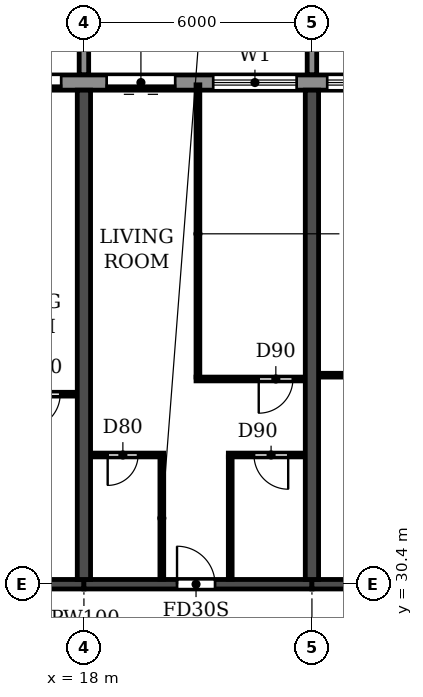
"""IFC4 building model, lengths in metres.
Left out: names, types, materials, properties, quantities, classifications, styles, units other than length and angle.
Written with IfcOpenShell. Run it as: python <this file> out.ifc"""

import sys

from ifc_helpers import new_model, si_unit, direction, frame, frame_2d, origin, place, context, subcontext, project, spatial, polyline, rectangle, outline, extrude, source, transform, mapped, element, fill, save


model = new_model("IFC4")
c1 = context("Model", 3, precision=1e-05, world=origin(), true_north=direction((0.0, 1.0)))
c2 = subcontext(c1, "Body", "Model", "MODEL_VIEW")
j1 = project(units=[si_unit("LENGTHUNIT", "METRE"), si_unit("PLANEANGLEUNIT", "RADIAN")], contexts=[c1])
p1 = place(None, origin())
s1 = spatial("IfcSite", under=j1, at=p1, CompositionType="ELEMENT")
p2 = place(p1, origin())
s2 = spatial("IfcBuilding", under=s1, at=p2, CompositionType="ELEMENT")
p3 = place(p2, frame((0.0, 0.0, 76.2)))
s3 = spatial("IfcBuildingStorey", under=s2, at=p3, CompositionType="ELEMENT", Elevation=76.2)
for number, where, z_axis, x_axis in (
    (1, (18.0, 30.525, 0.0), (0.0, 0.0, 1.0), (0.0, 1.0, 0.0)),
    (2, (24.0, 30.525, 0.0), (0.0, 0.0, 1.0), (0.0, 1.0, 0.0)),
):
    element("IfcWall", number, at=place(p3, frame(where, z_axis=z_axis, x_axis=x_axis)), inside=s3, PredefinedType="SHEAR", context=c2, shape_type="SweptSolid", body=[
        extrude(rectangle(XDim=12.875, YDim=0.35, at=frame_2d((6.438, 0.0))), origin(), (0.0, 0.0, 1.0), 3.06),
    ])
p4 = place(p3, frame((12.0, 30.4, 0.0), z_axis=(0.0, 0.0, 1.0), x_axis=(1.0, 0.0, 0.0)))
e3 = element("IfcWall", 3, at=p4, inside=s3, PredefinedType="SHEAR", context=c2, shape_type="SweptSolid", body=[
    extrude(rectangle(XDim=6.0, YDim=0.25, at=frame_2d((3.0, 0.0))), origin(), (0.0, 0.0, 1.0), 2.46),
])
p5 = place(p4, frame((2.45, 0.0, 0.0)))
e4 = element("IfcOpeningElement", 4, at=p5, cuts=e3, PredefinedType="OPENING", context=c2, shape_type="SweptSolid", body=[
    extrude(rectangle(XDim=1.0, YDim=2.1, at=frame_2d((0.5, 1.05))), frame((0.0, 0.135, 0.0), z_axis=(0.0, -1.0, 0.0), x_axis=(1.0, 0.0, 0.0)), (0.0, 0.0, 1.0), 0.27),
])
p6 = place(p3, frame((18.0, 30.4, 0.0), z_axis=(0.0, 0.0, 1.0), x_axis=(1.0, 0.0, 0.0)))
e5 = element("IfcWall", 5, at=p6, inside=s3, PredefinedType="SHEAR", context=c2, shape_type="SweptSolid", body=[
    extrude(rectangle(XDim=6.0, YDim=0.25, at=frame_2d((3.0, 0.0))), origin(), (0.0, 0.0, 1.0), 2.46),
])
p7 = place(p6, frame((2.45, 0.0, 0.0)))
e6 = element("IfcOpeningElement", 6, at=p7, cuts=e5, PredefinedType="OPENING", context=c2, shape_type="SweptSolid", body=[
    extrude(rectangle(XDim=1.0, YDim=2.1, at=frame_2d((0.5, 1.05))), frame((0.0, 0.135, 0.0), z_axis=(0.0, -1.0, 0.0), x_axis=(1.0, 0.0, 0.0)), (0.0, 0.0, 1.0), 0.27),
])
p8 = place(p3, frame((24.0, 30.4, 0.0), z_axis=(0.0, 0.0, 1.0), x_axis=(1.0, 0.0, 0.0)))
e7 = element("IfcWall", 7, at=p8, inside=s3, PredefinedType="SHEAR", context=c2, shape_type="SweptSolid", body=[
    extrude(rectangle(XDim=6.0, YDim=0.25, at=frame_2d((3.0, 0.0))), origin(), (0.0, 0.0, 1.0), 2.46),
])
p9 = place(p8, frame((2.55, 0.0, 0.0)))
e8 = element("IfcOpeningElement", 8, at=p9, cuts=e7, PredefinedType="OPENING", context=c2, shape_type="SweptSolid", body=[
    extrude(rectangle(XDim=1.0, YDim=2.1, at=frame_2d((0.5, 1.05))), frame((0.0, 0.135, 0.0), z_axis=(0.0, -1.0, 0.0), x_axis=(1.0, 0.0, 0.0)), (0.0, 0.0, 1.0), 0.27),
])
p10 = place(p3, frame((91.317, 43.6, 0.0), z_axis=(0.0, 0.0, 1.0), x_axis=(-1.0, 0.0, 0.0)))
e9 = element("IfcWall", 9, at=p10, inside=s3, PredefinedType="STANDARD", context=c2, shape_type="SweptSolid", body=[
    extrude(rectangle(XDim=80.634, YDim=0.4, at=frame_2d((40.317, 0.0))), origin(), (0.0, 0.0, 1.0), 3.06),
])
p11 = place(p10, frame((76.717, 0.0, 0.9)))
e10 = element("IfcOpeningElement", 10, at=p11, cuts=e9, PredefinedType="OPENING", context=c2, shape_type="SweptSolid", body=[
    extrude(rectangle(XDim=2.2, YDim=1.5, at=frame_2d((1.1, 0.75))), frame((0.0, 0.21, 0.0), z_axis=(0.0, -1.0, 0.0), x_axis=(1.0, 0.0, 0.0)), (0.0, 0.0, 1.0), 0.42),
])
p12 = place(p10, frame((73.917, 0.0, 0.0)))
e11 = element("IfcOpeningElement", 11, at=p12, cuts=e9, PredefinedType="OPENING", context=c2, shape_type="SweptSolid", body=[
    extrude(rectangle(XDim=1.8, YDim=2.4, at=frame_2d((0.9, 1.2))), frame((0.0, 0.21, 0.0), z_axis=(0.0, -1.0, 0.0), x_axis=(1.0, 0.0, 0.0)), (0.0, 0.0, 1.0), 0.42),
])
p13 = place(p10, frame((70.917, 0.0, 0.0)))
e12 = element("IfcOpeningElement", 12, at=p13, cuts=e9, PredefinedType="OPENING", context=c2, shape_type="SweptSolid", body=[
    extrude(rectangle(XDim=1.8, YDim=2.4, at=frame_2d((0.9, 1.2))), frame((0.0, 0.21, 0.0), z_axis=(0.0, -1.0, 0.0), x_axis=(1.0, 0.0, 0.0)), (0.0, 0.0, 1.0), 0.42),
])
p14 = place(p10, frame((67.717, 0.0, 0.9)))
e13 = element("IfcOpeningElement", 13, at=p14, cuts=e9, PredefinedType="OPENING", context=c2, shape_type="SweptSolid", body=[
    extrude(rectangle(XDim=2.2, YDim=1.5, at=frame_2d((1.1, 0.75))), frame((0.0, 0.21, 0.0), z_axis=(0.0, -1.0, 0.0), x_axis=(1.0, 0.0, 0.0)), (0.0, 0.0, 1.0), 0.42),
])
p15 = place(p10, frame((64.717, 0.0, 0.9)))
e14 = element("IfcOpeningElement", 14, at=p15, cuts=e9, PredefinedType="OPENING", context=c2, shape_type="SweptSolid", body=[
    extrude(rectangle(XDim=2.2, YDim=1.5, at=frame_2d((1.1, 0.75))), frame((0.0, 0.21, 0.0), z_axis=(0.0, -1.0, 0.0), x_axis=(1.0, 0.0, 0.0)), (0.0, 0.0, 1.0), 0.42),
])
p16 = place(p10, frame((61.917, 0.0, 0.0)))
e15 = element("IfcOpeningElement", 15, at=p16, cuts=e9, PredefinedType="OPENING", context=c2, shape_type="SweptSolid", body=[
    extrude(rectangle(XDim=1.8, YDim=2.4, at=frame_2d((0.9, 1.2))), frame((0.0, 0.21, 0.0), z_axis=(0.0, -1.0, 0.0), x_axis=(1.0, 0.0, 0.0)), (0.0, 0.0, 1.0), 0.42),
])
p17 = place(p10, frame((58.717, 0.0, 0.9)))
e16 = element("IfcOpeningElement", 16, at=p17, cuts=e9, PredefinedType="OPENING", context=c2, shape_type="SweptSolid", body=[
    extrude(rectangle(XDim=2.2, YDim=1.5, at=frame_2d((1.1, 0.75))), frame((0.0, 0.21, 0.0), z_axis=(0.0, -1.0, 0.0), x_axis=(1.0, 0.0, 0.0)), (0.0, 0.0, 1.0), 0.42),
])
p18 = place(p10, frame((55.917, 0.0, 0.0)))
e17 = element("IfcOpeningElement", 17, at=p18, cuts=e9, PredefinedType="OPENING", context=c2, shape_type="SweptSolid", body=[
    extrude(rectangle(XDim=1.8, YDim=2.4, at=frame_2d((0.9, 1.2))), frame((0.0, 0.21, 0.0), z_axis=(0.0, -1.0, 0.0), x_axis=(1.0, 0.0, 0.0)), (0.0, 0.0, 1.0), 0.42),
])
p19 = place(p10, frame((52.717, 0.0, 0.9)))
e18 = element("IfcOpeningElement", 18, at=p19, cuts=e9, PredefinedType="OPENING", context=c2, shape_type="SweptSolid", body=[
    extrude(rectangle(XDim=2.2, YDim=1.5, at=frame_2d((1.1, 0.75))), frame((0.0, 0.21, 0.0), z_axis=(0.0, -1.0, 0.0), x_axis=(1.0, 0.0, 0.0)), (0.0, 0.0, 1.0), 0.42),
])
p20 = place(p10, frame((49.717, 0.0, 0.9)))
e19 = element("IfcOpeningElement", 19, at=p20, cuts=e9, PredefinedType="OPENING", context=c2, shape_type="SweptSolid", body=[
    extrude(rectangle(XDim=2.2, YDim=1.5, at=frame_2d((1.1, 0.75))), frame((0.0, 0.21, 0.0), z_axis=(0.0, -1.0, 0.0), x_axis=(1.0, 0.0, 0.0)), (0.0, 0.0, 1.0), 0.42),
])
p21 = place(p10, frame((46.917, 0.0, 0.0)))
e20 = element("IfcOpeningElement", 20, at=p21, cuts=e9, PredefinedType="OPENING", context=c2, shape_type="SweptSolid", body=[
    extrude(rectangle(XDim=1.8, YDim=2.4, at=frame_2d((0.9, 1.2))), frame((0.0, 0.21, 0.0), z_axis=(0.0, -1.0, 0.0), x_axis=(1.0, 0.0, 0.0)), (0.0, 0.0, 1.0), 0.42),
])
p22 = place(p10, frame((43.717, 0.0, 0.9)))
e21 = element("IfcOpeningElement", 21, at=p22, cuts=e9, PredefinedType="OPENING", context=c2, shape_type="SweptSolid", body=[
    extrude(rectangle(XDim=2.2, YDim=1.5, at=frame_2d((1.1, 0.75))), frame((0.0, 0.21, 0.0), z_axis=(0.0, -1.0, 0.0), x_axis=(1.0, 0.0, 0.0)), (0.0, 0.0, 1.0), 0.42),
])
p23 = place(p10, frame((40.717, 0.0, 0.9)))
e22 = element("IfcOpeningElement", 22, at=p23, cuts=e9, PredefinedType="OPENING", context=c2, shape_type="SweptSolid", body=[
    extrude(rectangle(XDim=2.2, YDim=1.5, at=frame_2d((1.1, 0.75))), frame((0.0, 0.21, 0.0), z_axis=(0.0, -1.0, 0.0), x_axis=(1.0, 0.0, 0.0)), (0.0, 0.0, 1.0), 0.42),
])
p24 = place(p10, frame((37.917, 0.0, 0.0)))
e23 = element("IfcOpeningElement", 23, at=p24, cuts=e9, PredefinedType="OPENING", context=c2, shape_type="SweptSolid", body=[
    extrude(rectangle(XDim=1.8, YDim=2.4, at=frame_2d((0.9, 1.2))), frame((0.0, 0.21, 0.0), z_axis=(0.0, -1.0, 0.0), x_axis=(1.0, 0.0, 0.0)), (0.0, 0.0, 1.0), 0.42),
])
p25 = place(p10, frame((34.717, 0.0, 0.9)))
e24 = element("IfcOpeningElement", 24, at=p25, cuts=e9, PredefinedType="OPENING", context=c2, shape_type="SweptSolid", body=[
    extrude(rectangle(XDim=2.2, YDim=1.5, at=frame_2d((1.1, 0.75))), frame((0.0, 0.21, 0.0), z_axis=(0.0, -1.0, 0.0), x_axis=(1.0, 0.0, 0.0)), (0.0, 0.0, 1.0), 0.42),
])
p26 = place(p10, frame((31.917, 0.0, 0.0)))
e25 = element("IfcOpeningElement", 25, at=p26, cuts=e9, PredefinedType="OPENING", context=c2, shape_type="SweptSolid", body=[
    extrude(rectangle(XDim=1.8, YDim=2.4, at=frame_2d((0.9, 1.2))), frame((0.0, 0.21, 0.0), z_axis=(0.0, -1.0, 0.0), x_axis=(1.0, 0.0, 0.0)), (0.0, 0.0, 1.0), 0.42),
])
p27 = place(p10, frame((28.717, 0.0, 0.9)))
e26 = element("IfcOpeningElement", 26, at=p27, cuts=e9, PredefinedType="OPENING", context=c2, shape_type="SweptSolid", body=[
    extrude(rectangle(XDim=2.2, YDim=1.5, at=frame_2d((1.1, 0.75))), frame((0.0, 0.21, 0.0), z_axis=(0.0, -1.0, 0.0), x_axis=(1.0, 0.0, 0.0)), (0.0, 0.0, 1.0), 0.42),
])
p28 = place(p10, frame((25.717, 0.0, 0.9)))
e27 = element("IfcOpeningElement", 27, at=p28, cuts=e9, PredefinedType="OPENING", context=c2, shape_type="SweptSolid", body=[
    extrude(rectangle(XDim=2.2, YDim=1.5, at=frame_2d((1.1, 0.75))), frame((0.0, 0.21, 0.0), z_axis=(0.0, -1.0, 0.0), x_axis=(1.0, 0.0, 0.0)), (0.0, 0.0, 1.0), 0.42),
])
p29 = place(p10, frame((22.717, 0.0, 0.9)))
e28 = element("IfcOpeningElement", 28, at=p29, cuts=e9, PredefinedType="OPENING", context=c2, shape_type="SweptSolid", body=[
    extrude(rectangle(XDim=2.2, YDim=1.5, at=frame_2d((1.1, 0.75))), frame((0.0, 0.21, 0.0), z_axis=(0.0, -1.0, 0.0), x_axis=(1.0, 0.0, 0.0)), (0.0, 0.0, 1.0), 0.42),
])
p30 = place(p10, frame((19.917, 0.0, 0.0)))
e29 = element("IfcOpeningElement", 29, at=p30, cuts=e9, PredefinedType="OPENING", context=c2, shape_type="SweptSolid", body=[
    extrude(rectangle(XDim=1.8, YDim=2.4, at=frame_2d((0.9, 1.2))), frame((0.0, 0.21, 0.0), z_axis=(0.0, -1.0, 0.0), x_axis=(1.0, 0.0, 0.0)), (0.0, 0.0, 1.0), 0.42),
])
p31 = place(p10, frame((16.717, 0.0, 0.9)))
e30 = element("IfcOpeningElement", 30, at=p31, cuts=e9, PredefinedType="OPENING", context=c2, shape_type="SweptSolid", body=[
    extrude(rectangle(XDim=2.2, YDim=1.5, at=frame_2d((1.1, 0.75))), frame((0.0, 0.21, 0.0), z_axis=(0.0, -1.0, 0.0), x_axis=(1.0, 0.0, 0.0)), (0.0, 0.0, 1.0), 0.42),
])
p32 = place(p10, frame((13.717, 0.0, 0.9)))
e31 = element("IfcOpeningElement", 31, at=p32, cuts=e9, PredefinedType="OPENING", context=c2, shape_type="SweptSolid", body=[
    extrude(rectangle(XDim=2.2, YDim=1.5, at=frame_2d((1.1, 0.75))), frame((0.0, 0.21, 0.0), z_axis=(0.0, -1.0, 0.0), x_axis=(1.0, 0.0, 0.0)), (0.0, 0.0, 1.0), 0.42),
])
p33 = place(p10, frame((10.717, 0.0, 0.9)))
e32 = element("IfcOpeningElement", 32, at=p33, cuts=e9, PredefinedType="OPENING", context=c2, shape_type="SweptSolid", body=[
    extrude(rectangle(XDim=2.2, YDim=1.5, at=frame_2d((1.1, 0.75))), frame((0.0, 0.21, 0.0), z_axis=(0.0, -1.0, 0.0), x_axis=(1.0, 0.0, 0.0)), (0.0, 0.0, 1.0), 0.42),
])
p34 = place(p10, frame((7.917, 0.0, 0.0)))
e33 = element("IfcOpeningElement", 33, at=p34, cuts=e9, PredefinedType="OPENING", context=c2, shape_type="SweptSolid", body=[
    extrude(rectangle(XDim=1.8, YDim=2.4, at=frame_2d((0.9, 1.2))), frame((0.0, 0.21, 0.0), z_axis=(0.0, -1.0, 0.0), x_axis=(1.0, 0.0, 0.0)), (0.0, 0.0, 1.0), 0.42),
])
p35 = place(p10, frame((4.717, 0.0, 0.9)))
e34 = element("IfcOpeningElement", 34, at=p35, cuts=e9, PredefinedType="OPENING", context=c2, shape_type="SweptSolid", body=[
    extrude(rectangle(XDim=2.2, YDim=1.5, at=frame_2d((1.1, 0.75))), frame((0.0, 0.21, 0.0), z_axis=(0.0, -1.0, 0.0), x_axis=(1.0, 0.0, 0.0)), (0.0, 0.0, 1.0), 0.42),
])
p36 = place(p10, frame((1.917, 0.0, 0.0)))
e35 = element("IfcOpeningElement", 35, at=p36, cuts=e9, PredefinedType="OPENING", context=c2, shape_type="SweptSolid", body=[
    extrude(rectangle(XDim=1.8, YDim=2.4, at=frame_2d((0.9, 1.2))), frame((0.0, 0.21, 0.0), z_axis=(0.0, -1.0, 0.0), x_axis=(1.0, 0.0, 0.0)), (0.0, 0.0, 1.0), 0.42),
])
m1 = source(origin(), c2, "Body", "SweptSolid", [
    extrude(outline(polyline([(0.0, 0.0), (0.25, 0.0), (0.25, 3.1), (0.0, 3.1), (0.0, 0.0)])), origin(), (0.0, 0.0, 1.0), 3.1),
])
for number, where in (
    (36, (17.875, 43.8, 0.0)),
    (37, (23.875, 43.8, 0.0)),
):
    element("IfcWall", number, at=place(p3, frame(where)), inside=s3, PredefinedType="STANDARD", context=c2, shape_type="MappedRepresentation", body=[
        mapped(m1, transform((0.0, 0.0, 0.0))),
    ])
p37 = place(p3, frame((18.185, 33.8, 0.0), z_axis=(0.0, 0.0, 1.0), x_axis=(1.0, 0.0, 0.0)))
e38 = element("IfcWall", 38, at=p37, inside=s3, PredefinedType="PARTITIONING", context=c2, shape_type="SweptSolid", body=[
    extrude(rectangle(XDim=1.915, YDim=0.1, at=frame_2d((0.958, 0.0))), origin(), (0.0, 0.0, 1.0), 3.06),
])
p38 = place(p37, frame((0.44, 0.0, 0.0)))
e39 = element("IfcOpeningElement", 39, at=p38, cuts=e38, PredefinedType="OPENING", context=c2, shape_type="SweptSolid", body=[
    extrude(rectangle(XDim=0.8, YDim=2.1, at=frame_2d((0.4, 1.05))), frame((0.0, 0.06, 0.0), z_axis=(0.0, -1.0, 0.0), x_axis=(1.0, 0.0, 0.0)), (0.0, 0.0, 1.0), 0.12),
])
p39 = place(p3, frame((21.8, 33.8, 0.0), z_axis=(0.0, 0.0, 1.0), x_axis=(1.0, 0.0, 0.0)))
e40 = element("IfcWall", 40, at=p39, inside=s3, PredefinedType="PARTITIONING", context=c2, shape_type="SweptSolid", body=[
    extrude(rectangle(XDim=2.015, YDim=0.1, at=frame_2d((1.007, 0.0))), origin(), (0.0, 0.0, 1.0), 3.06),
])
p40 = place(p39, frame((0.675, 0.0, 0.0)))
e41 = element("IfcOpeningElement", 41, at=p40, cuts=e40, PredefinedType="OPENING", context=c2, shape_type="SweptSolid", body=[
    extrude(rectangle(XDim=0.9, YDim=2.1, at=frame_2d((0.45, 1.05))), frame((0.0, 0.06, 0.0), z_axis=(0.0, -1.0, 0.0), x_axis=(1.0, 0.0, 0.0)), (0.0, 0.0, 1.0), 0.12),
])
p41 = place(p3, frame((15.8, 35.4, 0.0), z_axis=(0.0, 0.0, 1.0), x_axis=(1.0, 0.0, 0.0)))
e42 = element("IfcWall", 42, at=p41, inside=s3, PredefinedType="PARTITIONING", context=c2, shape_type="SweptSolid", body=[
    extrude(rectangle(XDim=2.015, YDim=0.1, at=frame_2d((1.007, 0.0))), origin(), (0.0, 0.0, 1.0), 3.06),
])
p42 = place(p41, frame((0.675, 0.0, 0.0)))
e43 = element("IfcOpeningElement", 43, at=p42, cuts=e42, PredefinedType="OPENING", context=c2, shape_type="SweptSolid", body=[
    extrude(rectangle(XDim=0.9, YDim=2.1, at=frame_2d((0.45, 1.05))), frame((0.0, 0.06, 0.0), z_axis=(0.0, -1.0, 0.0), x_axis=(1.0, 0.0, 0.0)), (0.0, 0.0, 1.0), 0.12),
])
p43 = place(p3, frame((20.95, 35.8, 0.0), z_axis=(0.0, 0.0, 1.0), x_axis=(1.0, 0.0, 0.0)))
e44 = element("IfcWall", 44, at=p43, inside=s3, PredefinedType="PARTITIONING", context=c2, shape_type="SweptSolid", body=[
    extrude(rectangle(XDim=2.865, YDim=0.1, at=frame_2d((1.433, 0.0))), origin(), (0.0, 0.0, 1.0), 3.06),
])
p44 = place(p43, frame((1.65, 0.0, 0.0)))
e45 = element("IfcOpeningElement", 45, at=p44, cuts=e44, PredefinedType="OPENING", context=c2, shape_type="SweptSolid", body=[
    extrude(rectangle(XDim=0.9, YDim=2.1, at=frame_2d((0.45, 1.05))), frame((0.0, 0.06, 0.0), z_axis=(0.0, -1.0, 0.0), x_axis=(1.0, 0.0, 0.0)), (0.0, 0.0, 1.0), 0.12),
])
p45 = place(p3, frame((24.185, 35.9, 0.0), z_axis=(0.0, 0.0, 1.0), x_axis=(1.0, 0.0, 0.0)))
e46 = element("IfcWall", 46, at=p45, inside=s3, PredefinedType="PARTITIONING", context=c2, shape_type="SweptSolid", body=[
    extrude(rectangle(XDim=2.015, YDim=0.1, at=frame_2d((1.007, 0.0))), origin(), (0.0, 0.0, 1.0), 3.06),
])
p46 = place(p3, frame((20.05, 30.535, 0.0), z_axis=(0.0, 0.0, 1.0), x_axis=(0.0, 1.0, 0.0)))
e47 = element("IfcWall", 47, at=p46, inside=s3, PredefinedType="PARTITIONING", context=c2, shape_type="SweptSolid", body=[
    extrude(rectangle(XDim=3.215, YDim=0.1, at=frame_2d((1.607, 0.0))), origin(), (0.0, 0.0, 1.0), 3.06),
])
p47 = place(p3, frame((21.0, 35.85, 0.0), z_axis=(0.0, 0.0, 1.0), x_axis=(0.0, 1.0, 0.0)))
e48 = element("IfcWall", 48, at=p47, inside=s3, PredefinedType="PARTITIONING", context=c2, shape_type="SweptSolid", body=[
    extrude(rectangle(XDim=7.69, YDim=0.1, at=frame_2d((3.845, 0.0))), origin(), (0.0, 0.0, 1.0), 3.06),
])
p48 = place(p3, frame((21.85, 30.535, 0.0), z_axis=(0.0, 0.0, 1.0), x_axis=(0.0, 1.0, 0.0)))
e49 = element("IfcWall", 49, at=p48, inside=s3, PredefinedType="PARTITIONING", context=c2, shape_type="SweptSolid", body=[
    extrude(rectangle(XDim=3.215, YDim=0.1, at=frame_2d((1.607, 0.0))), origin(), (0.0, 0.0, 1.0), 3.06),
])
p49 = place(p12, origin())
e50 = element("IfcDoor", 50, at=p49, inside=s3, OperationType="DOUBLE_DOOR_SLIDING", PredefinedType="DOOR", context=c2, shape_type="SweptSolid", body=[
    extrude(rectangle(XDim=1.8, YDim=2.4, at=frame_2d((0.9, 1.2))), frame((0.0, 0.025, 0.0), z_axis=(0.0, -1.0, 0.0), x_axis=(1.0, 0.0, 0.0)), (0.0, 0.0, 1.0), 0.05),
])
fill(e11, e50)
p50 = place(p13, origin())
e51 = element("IfcDoor", 51, at=p50, inside=s3, OperationType="DOUBLE_DOOR_SLIDING", PredefinedType="DOOR", context=c2, shape_type="SweptSolid", body=[
    extrude(rectangle(XDim=1.8, YDim=2.4, at=frame_2d((0.9, 1.2))), frame((0.0, 0.025, 0.0), z_axis=(0.0, -1.0, 0.0), x_axis=(1.0, 0.0, 0.0)), (0.0, 0.0, 1.0), 0.05),
])
fill(e12, e51)
p51 = place(p14, origin())
e52 = element("IfcWindow", 52, at=p51, inside=s3, PartitioningType="DOUBLE_PANEL_HORIZONTAL", PredefinedType="WINDOW", context=c2, shape_type="SweptSolid", body=[
    extrude(rectangle(XDim=2.2, YDim=1.5, at=frame_2d((1.1, 0.75))), frame((0.0, 0.03, 0.0), z_axis=(0.0, -1.0, 0.0), x_axis=(1.0, 0.0, 0.0)), (0.0, 0.0, 1.0), 0.06),
])
fill(e13, e52)
p52 = place(p15, origin())
e53 = element("IfcWindow", 53, at=p52, inside=s3, PartitioningType="DOUBLE_PANEL_HORIZONTAL", PredefinedType="WINDOW", context=c2, shape_type="SweptSolid", body=[
    extrude(rectangle(XDim=2.2, YDim=1.5, at=frame_2d((1.1, 0.75))), frame((0.0, 0.03, 0.0), z_axis=(0.0, -1.0, 0.0), x_axis=(1.0, 0.0, 0.0)), (0.0, 0.0, 1.0), 0.06),
])
fill(e14, e53)
p53 = place(p42, frame((0.9, 0.0, 0.0), z_axis=(0.0, 0.0, 1.0), x_axis=(-1.0, 0.0, 0.0)))
e54 = element("IfcDoor", 54, at=p53, inside=s3, OperationType="SINGLE_SWING_RIGHT", PredefinedType="DOOR", context=c2, shape_type="SweptSolid", body=[
    extrude(rectangle(XDim=0.9, YDim=2.1, at=frame_2d((0.45, 1.05))), frame((0.0, 0.025, 0.0), z_axis=(0.0, -1.0, 0.0), x_axis=(1.0, 0.0, 0.0)), (0.0, 0.0, 1.0), 0.05),
])
fill(e43, e54)
p54 = place(p38, frame((0.8, 0.0, 0.0), z_axis=(0.0, 0.0, 1.0), x_axis=(-1.0, 0.0, 0.0)))
e55 = element("IfcDoor", 55, at=p54, inside=s3, OperationType="SINGLE_SWING_RIGHT", PredefinedType="DOOR", context=c2, shape_type="SweptSolid", body=[
    extrude(rectangle(XDim=0.8, YDim=2.1, at=frame_2d((0.4, 1.05))), frame((0.0, 0.025, 0.0), z_axis=(0.0, -1.0, 0.0), x_axis=(1.0, 0.0, 0.0)), (0.0, 0.0, 1.0), 0.05),
])
fill(e39, e55)
p55 = place(p7, origin())
e56 = element("IfcDoor", 56, at=p55, inside=s3, OperationType="SINGLE_SWING_LEFT", PredefinedType="DOOR", context=c2, shape_type="SweptSolid", body=[
    extrude(rectangle(XDim=1.0, YDim=2.1, at=frame_2d((0.5, 1.05))), frame((0.0, 0.025, 0.0), z_axis=(0.0, -1.0, 0.0), x_axis=(1.0, 0.0, 0.0)), (0.0, 0.0, 1.0), 0.05),
])
fill(e6, e56)
p56 = place(p40, frame((0.9, 0.0, 0.0), z_axis=(0.0, 0.0, 1.0), x_axis=(-1.0, 0.0, 0.0)))
e57 = element("IfcDoor", 57, at=p56, inside=s3, OperationType="SINGLE_SWING_LEFT", PredefinedType="DOOR", context=c2, shape_type="SweptSolid", body=[
    extrude(rectangle(XDim=0.9, YDim=2.1, at=frame_2d((0.45, 1.05))), frame((0.0, 0.025, 0.0), z_axis=(0.0, -1.0, 0.0), x_axis=(1.0, 0.0, 0.0)), (0.0, 0.0, 1.0), 0.05),
])
fill(e41, e57)
p57 = place(p44, frame((0.9, 0.0, 0.0), z_axis=(0.0, 0.0, 1.0), x_axis=(-1.0, 0.0, 0.0)))
e58 = element("IfcDoor", 58, at=p57, inside=s3, OperationType="SINGLE_SWING_RIGHT", PredefinedType="DOOR", context=c2, shape_type="SweptSolid", body=[
    extrude(rectangle(XDim=0.9, YDim=2.1, at=frame_2d((0.45, 1.05))), frame((0.0, 0.025, 0.0), z_axis=(0.0, -1.0, 0.0), x_axis=(1.0, 0.0, 0.0)), (0.0, 0.0, 1.0), 0.05),
])
fill(e45, e58)
save(model, sys.argv[1])
